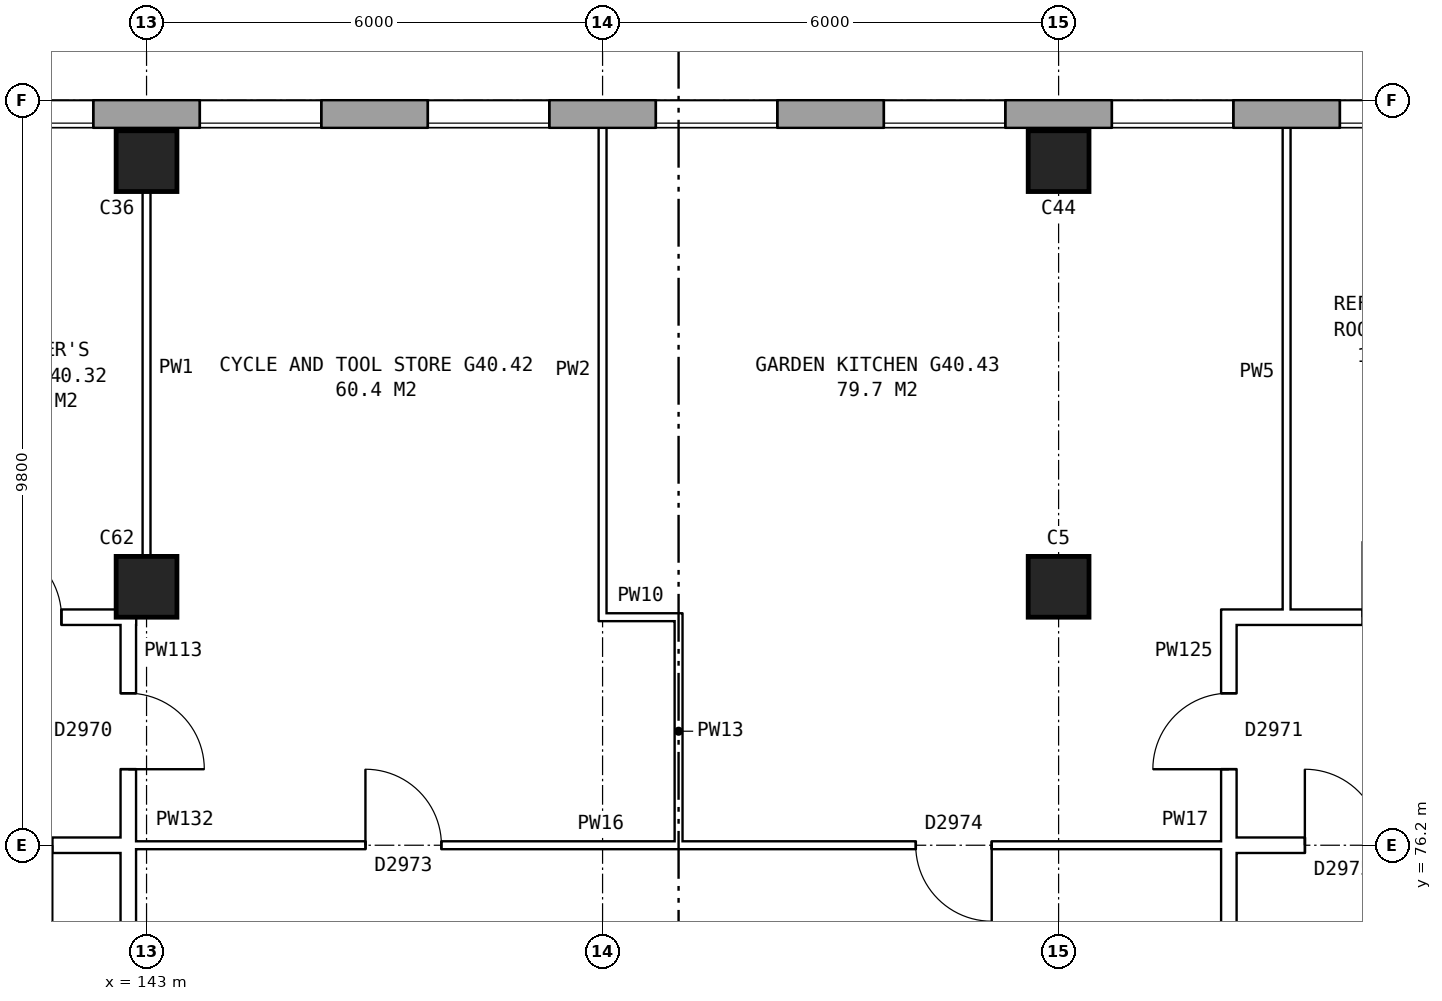
"""IFC4 building model, lengths in metres.
Left out: names, types, materials, properties, quantities, classifications, styles, units other than length and angle.
Written with IfcOpenShell. Run it as: python <this file> out.ifc"""

import sys

from ifc_helpers import new_model, si_unit, direction, frame, frame_2d, origin, origin_2d, place, context, subcontext, project, spatial, rectangle, extrude, element, fill, save


model = new_model("IFC4")
c1 = context("Model", 3, precision=1e-05, world=origin(), true_north=direction((0.0, 1.0)))
c2 = subcontext(c1, "Body", "Model", "MODEL_VIEW")
j1 = project(units=[si_unit("LENGTHUNIT", "METRE"), si_unit("PLANEANGLEUNIT", "RADIAN")], contexts=[c1])
p1 = place(None, origin())
s1 = spatial("IfcSite", under=j1, at=p1, CompositionType="ELEMENT")
p2 = place(p1, origin())
s2 = spatial("IfcBuilding", under=s1, at=p2, CompositionType="ELEMENT")
p3 = place(p2, frame((0.0, 0.0, 142.3)))
s3 = spatial("IfcBuildingStorey", under=s2, at=p3, CompositionType="ELEMENT", Elevation=142.3)
for number, where, z_axis, x_axis in (
    (1, (143.0, 79.6, 0.0), (0.0, 0.0, 1.0), (1.0, 0.0, 0.0)),
    (2, (143.0, 85.2, 0.0), (0.0, 0.0, 1.0), (1.0, 0.0, 0.0)),
    (3, (155.0, 79.6, 0.0), (0.0, 0.0, 1.0), (1.0, 0.0, 0.0)),
    (4, (155.0, 85.2, 0.0), (0.0, 0.0, 1.0), (1.0, 0.0, 0.0)),
):
    element("IfcColumn", number, at=place(p3, frame(where, z_axis=z_axis, x_axis=x_axis)), inside=s3, PredefinedType="COLUMN", context=c2, shape_type="SweptSolid", body=[
        extrude(rectangle(XDim=0.8, YDim=0.8, at=origin_2d()), origin(), (0.0, 0.0, 1.0), 5.6),
    ])
p4 = place(p3, frame((168.425, 85.82, 0.0), z_axis=(0.0, 0.0, 1.0), x_axis=(-1.0, 0.0, 0.0)))
e5 = element("IfcWall", 5, at=p4, inside=s3, PredefinedType="STANDARD", context=c2, shape_type="SweptSolid", body=[
    extrude(rectangle(XDim=34.351, YDim=0.36, at=frame_2d((17.175, 0.0))), origin(), (0.0, 0.0, 1.0), 5.6),
])
p5 = place(p4, frame((2.125, 0.0, 0.15)))
e6 = element("IfcOpeningElement", 6, at=p5, cuts=e5, PredefinedType="OPENING", context=c2, shape_type="SweptSolid", body=[
    extrude(rectangle(XDim=1.6, YDim=2.4, at=frame_2d((0.8, 1.2))), frame((0.0, 0.19, 0.0), z_axis=(0.0, -1.0, 0.0), x_axis=(1.0, 0.0, 0.0)), (0.0, 0.0, 1.0), 0.38),
])
p6 = place(p4, frame((5.125, 0.0, 0.15)))
e7 = element("IfcOpeningElement", 7, at=p6, cuts=e5, PredefinedType="OPENING", context=c2, shape_type="SweptSolid", body=[
    extrude(rectangle(XDim=1.6, YDim=2.4, at=frame_2d((0.8, 1.2))), frame((0.0, 0.19, 0.0), z_axis=(0.0, -1.0, 0.0), x_axis=(1.0, 0.0, 0.0)), (0.0, 0.0, 1.0), 0.38),
])
p7 = place(p4, frame((8.125, 0.0, 0.15)))
e8 = element("IfcOpeningElement", 8, at=p7, cuts=e5, PredefinedType="OPENING", context=c2, shape_type="SweptSolid", body=[
    extrude(rectangle(XDim=1.6, YDim=2.4, at=frame_2d((0.8, 1.2))), frame((0.0, 0.19, 0.0), z_axis=(0.0, -1.0, 0.0), x_axis=(1.0, 0.0, 0.0)), (0.0, 0.0, 1.0), 0.38),
])
p8 = place(p4, frame((11.125, 0.0, 0.15)))
e9 = element("IfcOpeningElement", 9, at=p8, cuts=e5, PredefinedType="OPENING", context=c2, shape_type="SweptSolid", body=[
    extrude(rectangle(XDim=1.6, YDim=2.4, at=frame_2d((0.8, 1.2))), frame((0.0, 0.19, 0.0), z_axis=(0.0, -1.0, 0.0), x_axis=(1.0, 0.0, 0.0)), (0.0, 0.0, 1.0), 0.38),
])
p9 = place(p4, frame((14.125, 0.0, 0.15)))
e10 = element("IfcOpeningElement", 10, at=p9, cuts=e5, PredefinedType="OPENING", context=c2, shape_type="SweptSolid", body=[
    extrude(rectangle(XDim=1.6, YDim=2.4, at=frame_2d((0.8, 1.2))), frame((0.0, 0.19, 0.0), z_axis=(0.0, -1.0, 0.0), x_axis=(1.0, 0.0, 0.0)), (0.0, 0.0, 1.0), 0.38),
])
p10 = place(p4, frame((17.125, 0.0, 0.15)))
e11 = element("IfcOpeningElement", 11, at=p10, cuts=e5, PredefinedType="OPENING", context=c2, shape_type="SweptSolid", body=[
    extrude(rectangle(XDim=1.6, YDim=2.4, at=frame_2d((0.8, 1.2))), frame((0.0, 0.19, 0.0), z_axis=(0.0, -1.0, 0.0), x_axis=(1.0, 0.0, 0.0)), (0.0, 0.0, 1.0), 0.38),
])
p11 = place(p4, frame((20.125, 0.0, 0.15)))
e12 = element("IfcOpeningElement", 12, at=p11, cuts=e5, PredefinedType="OPENING", context=c2, shape_type="SweptSolid", body=[
    extrude(rectangle(XDim=1.6, YDim=2.4, at=frame_2d((0.8, 1.2))), frame((0.0, 0.19, 0.0), z_axis=(0.0, -1.0, 0.0), x_axis=(1.0, 0.0, 0.0)), (0.0, 0.0, 1.0), 0.38),
])
p12 = place(p4, frame((23.125, 0.0, 0.15)))
e13 = element("IfcOpeningElement", 13, at=p12, cuts=e5, PredefinedType="OPENING", context=c2, shape_type="SweptSolid", body=[
    extrude(rectangle(XDim=1.6, YDim=2.4, at=frame_2d((0.8, 1.2))), frame((0.0, 0.19, 0.0), z_axis=(0.0, -1.0, 0.0), x_axis=(1.0, 0.0, 0.0)), (0.0, 0.0, 1.0), 0.38),
])
p13 = place(p4, frame((26.125, 0.0, 0.15)))
e14 = element("IfcOpeningElement", 14, at=p13, cuts=e5, PredefinedType="OPENING", context=c2, shape_type="SweptSolid", body=[
    extrude(rectangle(XDim=1.6, YDim=2.4, at=frame_2d((0.8, 1.2))), frame((0.0, 0.19, 0.0), z_axis=(0.0, -1.0, 0.0), x_axis=(1.0, 0.0, 0.0)), (0.0, 0.0, 1.0), 0.38),
])
p14 = place(p4, frame((29.125, 0.0, 0.15)))
e15 = element("IfcOpeningElement", 15, at=p14, cuts=e5, PredefinedType="OPENING", context=c2, shape_type="SweptSolid", body=[
    extrude(rectangle(XDim=1.6, YDim=2.4, at=frame_2d((0.8, 1.2))), frame((0.0, 0.19, 0.0), z_axis=(0.0, -1.0, 0.0), x_axis=(1.0, 0.0, 0.0)), (0.0, 0.0, 1.0), 0.38),
])
p15 = place(p4, frame((32.125, 0.0, 0.15)))
e16 = element("IfcOpeningElement", 16, at=p15, cuts=e5, PredefinedType="OPENING", context=c2, shape_type="SweptSolid", body=[
    extrude(rectangle(XDim=1.6, YDim=2.4, at=frame_2d((0.8, 1.2))), frame((0.0, 0.19, 0.0), z_axis=(0.0, -1.0, 0.0), x_axis=(1.0, 0.0, 0.0)), (0.0, 0.0, 1.0), 0.38),
])
p16 = place(p3, frame((142.76, 63.9, 0.0), z_axis=(0.0, 0.0, 1.0), x_axis=(0.0, 1.0, 0.0)))
e17 = element("IfcWall", 17, at=p16, inside=s3, PredefinedType="PARTITIONING", context=c2, shape_type="SweptSolid", body=[
    extrude(rectangle(XDim=12.2, YDim=0.2, at=frame_2d((6.1, 0.0))), origin(), (0.0, 0.0, 1.0), 5.6),
])
p17 = place(p16, frame((5.1, 0.0, 0.0)))
e18 = element("IfcOpeningElement", 18, at=p17, cuts=e17, PredefinedType="OPENING", context=c2, shape_type="SweptSolid", body=[
    extrude(rectangle(XDim=2.0, YDim=2.1, at=frame_2d((1.0, 1.05))), frame((0.0, 0.11, 0.0), z_axis=(0.0, -1.0, 0.0), x_axis=(1.0, 0.0, 0.0)), (0.0, 0.0, 1.0), 0.22),
])
p18 = place(p3, frame((157.24, 63.9, 0.0), z_axis=(0.0, 0.0, 1.0), x_axis=(0.0, 1.0, 0.0)))
e19 = element("IfcWall", 19, at=p18, inside=s3, PredefinedType="PARTITIONING", context=c2, shape_type="SweptSolid", body=[
    extrude(rectangle(XDim=12.2, YDim=0.2, at=frame_2d((6.1, 0.0))), origin(), (0.0, 0.0, 1.0), 5.6),
])
p19 = place(p18, frame((5.1, 0.0, 0.0)))
e20 = element("IfcOpeningElement", 20, at=p19, cuts=e19, PredefinedType="OPENING", context=c2, shape_type="SweptSolid", body=[
    extrude(rectangle(XDim=2.0, YDim=2.1, at=frame_2d((1.0, 1.05))), frame((0.0, 0.11, 0.0), z_axis=(0.0, -1.0, 0.0), x_axis=(1.0, 0.0, 0.0)), (0.0, 0.0, 1.0), 0.22),
])
p20 = place(p3, frame((139.76, 76.2, 0.0), z_axis=(0.0, 0.0, 1.0), x_axis=(1.0, 0.0, 0.0)))
e21 = element("IfcWall", 21, at=p20, inside=s3, PredefinedType="PARTITIONING", context=c2, shape_type="SweptSolid", body=[
    extrude(rectangle(XDim=3.1, YDim=0.2, at=frame_2d((1.55, 0.0))), origin(), (0.0, 0.0, 1.0), 5.6),
])
p21 = place(p20, frame((1.0, 0.0, 0.0)))
e22 = element("IfcOpeningElement", 22, at=p21, cuts=e21, PredefinedType="OPENING", context=c2, shape_type="SweptSolid", body=[
    extrude(rectangle(XDim=1.0, YDim=2.1, at=frame_2d((0.5, 1.05))), frame((0.0, 0.11, 0.0), z_axis=(0.0, -1.0, 0.0), x_axis=(1.0, 0.0, 0.0)), (0.0, 0.0, 1.0), 0.22),
])
p22 = place(p3, frame((157.14, 76.2, 0.0), z_axis=(0.0, 0.0, 1.0), x_axis=(1.0, 0.0, 0.0)))
e23 = element("IfcWall", 23, at=p22, inside=s3, PredefinedType="PARTITIONING", context=c2, shape_type="SweptSolid", body=[
    extrude(rectangle(XDim=3.1, YDim=0.2, at=frame_2d((1.55, 0.0))), origin(), (0.0, 0.0, 1.0), 5.6),
])
p23 = place(p22, frame((1.1, 0.0, 0.0)))
e24 = element("IfcOpeningElement", 24, at=p23, cuts=e23, PredefinedType="OPENING", context=c2, shape_type="SweptSolid", body=[
    extrude(rectangle(XDim=1.0, YDim=2.1, at=frame_2d((0.5, 1.05))), frame((0.0, 0.11, 0.0), z_axis=(0.0, -1.0, 0.0), x_axis=(1.0, 0.0, 0.0)), (0.0, 0.0, 1.0), 0.22),
])
p24 = place(p3, frame((142.66, 76.2, 0.0), z_axis=(0.0, 0.0, 1.0), x_axis=(1.0, 0.0, 0.0)))
e25 = element("IfcWall", 25, at=p24, inside=s3, PredefinedType="PARTITIONING", context=c2, shape_type="SweptSolid", body=[
    extrude(rectangle(XDim=14.68, YDim=0.1, at=frame_2d((7.34, 0.0))), origin(), (0.0, 0.0, 1.0), 5.6),
])
p25 = place(p24, frame((3.22, 0.0, 0.0)))
e26 = element("IfcOpeningElement", 26, at=p25, cuts=e25, PredefinedType="OPENING", context=c2, shape_type="SweptSolid", body=[
    extrude(rectangle(XDim=1.0, YDim=2.1, at=frame_2d((0.5, 1.05))), frame((0.0, 0.06, 0.0), z_axis=(0.0, -1.0, 0.0), x_axis=(1.0, 0.0, 0.0)), (0.0, 0.0, 1.0), 0.12),
])
p26 = place(p24, frame((10.46, 0.0, 0.0)))
e27 = element("IfcOpeningElement", 27, at=p26, cuts=e25, PredefinedType="OPENING", context=c2, shape_type="SweptSolid", body=[
    extrude(rectangle(XDim=1.0, YDim=2.1, at=frame_2d((0.5, 1.05))), frame((0.0, 0.06, 0.0), z_axis=(0.0, -1.0, 0.0), x_axis=(1.0, 0.0, 0.0)), (0.0, 0.0, 1.0), 0.12),
])
p27 = place(p3, frame((131.24, 79.2, 0.0), z_axis=(0.0, 0.0, 1.0), x_axis=(1.0, 0.0, 0.0)))
e28 = element("IfcWall", 28, at=p27, inside=s3, PredefinedType="PARTITIONING", context=c2, shape_type="SweptSolid", body=[
    extrude(rectangle(XDim=11.622, YDim=0.2, at=frame_2d((5.811, 0.0))), origin(), (0.0, 0.0, 1.0), 5.6),
])
p28 = place(p27, frame((2.44, 0.0, 0.0)))
e29 = element("IfcOpeningElement", 29, at=p28, cuts=e28, PredefinedType="OPENING", context=c2, shape_type="SweptSolid", body=[
    extrude(rectangle(XDim=1.0, YDim=2.1, at=frame_2d((0.5, 1.05))), frame((0.0, 0.11, 0.0), z_axis=(0.0, -1.0, 0.0), x_axis=(1.0, 0.0, 0.0)), (0.0, 0.0, 1.0), 0.22),
])
p29 = place(p27, frame((6.81, 0.0, 0.0)))
e30 = element("IfcOpeningElement", 30, at=p29, cuts=e28, PredefinedType="OPENING", context=c2, shape_type="SweptSolid", body=[
    extrude(rectangle(XDim=0.9, YDim=2.1, at=frame_2d((0.45, 1.05))), frame((0.0, 0.11, 0.0), z_axis=(0.0, -1.0, 0.0), x_axis=(1.0, 0.0, 0.0)), (0.0, 0.0, 1.0), 0.22),
])
p30 = place(p27, frame((9.641, 0.0, 0.0)))
e31 = element("IfcOpeningElement", 31, at=p30, cuts=e28, PredefinedType="OPENING", context=c2, shape_type="SweptSolid", body=[
    extrude(rectangle(XDim=1.0, YDim=2.1, at=frame_2d((0.5, 1.05))), frame((0.0, 0.11, 0.0), z_axis=(0.0, -1.0, 0.0), x_axis=(1.0, 0.0, 0.0)), (0.0, 0.0, 1.0), 0.22),
])
p31 = place(p3, frame((157.14, 79.2, 0.0), z_axis=(0.0, 0.0, 1.0), x_axis=(1.0, 0.0, 0.0)))
e32 = element("IfcWall", 32, at=p31, inside=s3, PredefinedType="PARTITIONING", context=c2, shape_type="SweptSolid", body=[
    extrude(rectangle(XDim=14.12, YDim=0.2, at=frame_2d((7.06, 0.0))), origin(), (0.0, 0.0, 1.0), 5.6),
])
p32 = place(p31, frame((1.86, 0.0, 0.0)))
e33 = element("IfcOpeningElement", 33, at=p32, cuts=e32, PredefinedType="OPENING", context=c2, shape_type="SweptSolid", body=[
    extrude(rectangle(XDim=1.0, YDim=2.1, at=frame_2d((0.5, 1.05))), frame((0.0, 0.11, 0.0), z_axis=(0.0, -1.0, 0.0), x_axis=(1.0, 0.0, 0.0)), (0.0, 0.0, 1.0), 0.22),
])
p33 = place(p31, frame((4.91, 0.0, 0.0)))
e34 = element("IfcOpeningElement", 34, at=p33, cuts=e32, PredefinedType="OPENING", context=c2, shape_type="SweptSolid", body=[
    extrude(rectangle(XDim=0.9, YDim=2.1, at=frame_2d((0.45, 1.05))), frame((0.0, 0.11, 0.0), z_axis=(0.0, -1.0, 0.0), x_axis=(1.0, 0.0, 0.0)), (0.0, 0.0, 1.0), 0.22),
])
p34 = place(p31, frame((7.91, 0.0, 0.0)))
e35 = element("IfcOpeningElement", 35, at=p34, cuts=e32, PredefinedType="OPENING", context=c2, shape_type="SweptSolid", body=[
    extrude(rectangle(XDim=0.9, YDim=2.1, at=frame_2d((0.45, 1.05))), frame((0.0, 0.11, 0.0), z_axis=(0.0, -1.0, 0.0), x_axis=(1.0, 0.0, 0.0)), (0.0, 0.0, 1.0), 0.22),
])
p35 = place(p31, frame((11.43, 0.0, 0.0)))
e36 = element("IfcOpeningElement", 36, at=p35, cuts=e32, PredefinedType="OPENING", context=c2, shape_type="SweptSolid", body=[
    extrude(rectangle(XDim=1.0, YDim=2.1, at=frame_2d((0.5, 1.05))), frame((0.0, 0.11, 0.0), z_axis=(0.0, -1.0, 0.0), x_axis=(1.0, 0.0, 0.0)), (0.0, 0.0, 1.0), 0.22),
])
p36 = place(p3, frame((148.95, 79.2, 0.0), z_axis=(0.0, 0.0, 1.0), x_axis=(1.0, 0.0, 0.0)))
e37 = element("IfcWall", 37, at=p36, inside=s3, PredefinedType="PARTITIONING", context=c2, shape_type="SweptSolid", body=[
    extrude(rectangle(XDim=1.1, YDim=0.1, at=frame_2d((0.55, 0.0))), origin(), (0.0, 0.0, 1.0), 5.6),
])
p37 = place(p3, frame((142.76, 76.1, 0.0), z_axis=(0.0, 0.0, 1.0), x_axis=(0.0, 1.0, 0.0)))
e38 = element("IfcWall", 38, at=p37, inside=s3, PredefinedType="PARTITIONING", context=c2, shape_type="SweptSolid", body=[
    extrude(rectangle(XDim=3.2, YDim=0.2, at=frame_2d((1.6, 0.0))), origin(), (0.0, 0.0, 1.0), 5.6),
])
p38 = place(p37, frame((1.1, 0.0, 0.0)))
e39 = element("IfcOpeningElement", 39, at=p38, cuts=e38, PredefinedType="OPENING", context=c2, shape_type="SweptSolid", body=[
    extrude(rectangle(XDim=1.0, YDim=2.1, at=frame_2d((0.5, 1.05))), frame((0.0, 0.11, 0.0), z_axis=(0.0, -1.0, 0.0), x_axis=(1.0, 0.0, 0.0)), (0.0, 0.0, 1.0), 0.22),
])
p39 = place(p3, frame((143.0, 79.2, 0.0), z_axis=(0.0, 0.0, 1.0), x_axis=(0.0, 1.0, 0.0)))
e40 = element("IfcWall", 40, at=p39, inside=s3, PredefinedType="PARTITIONING", context=c2, shape_type="SweptSolid", body=[
    extrude(rectangle(XDim=6.56, YDim=0.1, at=frame_2d((3.28, 0.0))), origin(), (0.0, 0.0, 1.0), 5.6),
])
p40 = place(p3, frame((149.0, 79.15, 0.0), z_axis=(0.0, 0.0, 1.0), x_axis=(0.0, 1.0, 0.0)))
e41 = element("IfcWall", 41, at=p40, inside=s3, PredefinedType="PARTITIONING", context=c2, shape_type="SweptSolid", body=[
    extrude(rectangle(XDim=6.61, YDim=0.1, at=frame_2d((3.305, 0.0))), origin(), (0.0, 0.0, 1.0), 5.6),
])
p41 = place(p3, frame((150.0, 76.15, 0.0), z_axis=(0.0, 0.0, 1.0), x_axis=(0.0, 1.0, 0.0)))
e42 = element("IfcWall", 42, at=p41, inside=s3, PredefinedType="PARTITIONING", context=c2, shape_type="SweptSolid", body=[
    extrude(rectangle(XDim=3.1, YDim=0.1, at=frame_2d((1.55, 0.0))), origin(), (0.0, 0.0, 1.0), 5.6),
])
p42 = place(p3, frame((157.24, 76.1, 0.0), z_axis=(0.0, 0.0, 1.0), x_axis=(0.0, 1.0, 0.0)))
e43 = element("IfcWall", 43, at=p42, inside=s3, PredefinedType="PARTITIONING", context=c2, shape_type="SweptSolid", body=[
    extrude(rectangle(XDim=3.2, YDim=0.2, at=frame_2d((1.6, 0.0))), origin(), (0.0, 0.0, 1.0), 5.6),
])
p43 = place(p42, frame((1.1, 0.0, 0.0)))
e44 = element("IfcOpeningElement", 44, at=p43, cuts=e43, PredefinedType="OPENING", context=c2, shape_type="SweptSolid", body=[
    extrude(rectangle(XDim=1.0, YDim=2.1, at=frame_2d((0.5, 1.05))), frame((0.0, 0.11, 0.0), z_axis=(0.0, -1.0, 0.0), x_axis=(1.0, 0.0, 0.0)), (0.0, 0.0, 1.0), 0.22),
])
p44 = place(p3, frame((158.0, 79.1, 0.0), z_axis=(0.0, 0.0, 1.0), x_axis=(0.0, 1.0, 0.0)))
e45 = element("IfcWall", 45, at=p44, inside=s3, PredefinedType="PARTITIONING", context=c2, shape_type="SweptSolid", body=[
    extrude(rectangle(XDim=6.66, YDim=0.1, at=frame_2d((3.33, 0.0))), origin(), (0.0, 0.0, 1.0), 5.6),
])
p45 = place(p7, origin())
e46 = element("IfcWindow", 46, at=p45, inside=s3, PartitioningType="SINGLE_PANEL", PredefinedType="WINDOW", context=c2, shape_type="SweptSolid", body=[
    extrude(rectangle(XDim=1.6, YDim=2.4, at=frame_2d((0.8, 1.2))), frame((0.0, 0.15, 0.0), z_axis=(0.0, -1.0, 0.0), x_axis=(1.0, 0.0, 0.0)), (0.0, 0.0, 1.0), 0.06),
])
fill(e8, e46)
p46 = place(p8, origin())
e47 = element("IfcWindow", 47, at=p46, inside=s3, PartitioningType="SINGLE_PANEL", PredefinedType="WINDOW", context=c2, shape_type="SweptSolid", body=[
    extrude(rectangle(XDim=1.6, YDim=2.4, at=frame_2d((0.8, 1.2))), frame((0.0, 0.15, 0.0), z_axis=(0.0, -1.0, 0.0), x_axis=(1.0, 0.0, 0.0)), (0.0, 0.0, 1.0), 0.06),
])
fill(e9, e47)
p47 = place(p9, origin())
e48 = element("IfcWindow", 48, at=p47, inside=s3, PartitioningType="SINGLE_PANEL", PredefinedType="WINDOW", context=c2, shape_type="SweptSolid", body=[
    extrude(rectangle(XDim=1.6, YDim=2.4, at=frame_2d((0.8, 1.2))), frame((0.0, 0.15, 0.0), z_axis=(0.0, -1.0, 0.0), x_axis=(1.0, 0.0, 0.0)), (0.0, 0.0, 1.0), 0.06),
])
fill(e10, e48)
p48 = place(p10, origin())
e49 = element("IfcWindow", 49, at=p48, inside=s3, PartitioningType="SINGLE_PANEL", PredefinedType="WINDOW", context=c2, shape_type="SweptSolid", body=[
    extrude(rectangle(XDim=1.6, YDim=2.4, at=frame_2d((0.8, 1.2))), frame((0.0, 0.15, 0.0), z_axis=(0.0, -1.0, 0.0), x_axis=(1.0, 0.0, 0.0)), (0.0, 0.0, 1.0), 0.06),
])
fill(e11, e49)
p49 = place(p11, origin())
e50 = element("IfcWindow", 50, at=p49, inside=s3, PartitioningType="SINGLE_PANEL", PredefinedType="WINDOW", context=c2, shape_type="SweptSolid", body=[
    extrude(rectangle(XDim=1.6, YDim=2.4, at=frame_2d((0.8, 1.2))), frame((0.0, 0.15, 0.0), z_axis=(0.0, -1.0, 0.0), x_axis=(1.0, 0.0, 0.0)), (0.0, 0.0, 1.0), 0.06),
])
fill(e12, e50)
p50 = place(p12, origin())
e51 = element("IfcWindow", 51, at=p50, inside=s3, PartitioningType="SINGLE_PANEL", PredefinedType="WINDOW", context=c2, shape_type="SweptSolid", body=[
    extrude(rectangle(XDim=1.6, YDim=2.4, at=frame_2d((0.8, 1.2))), frame((0.0, 0.15, 0.0), z_axis=(0.0, -1.0, 0.0), x_axis=(1.0, 0.0, 0.0)), (0.0, 0.0, 1.0), 0.06),
])
fill(e13, e51)
p51 = place(p13, origin())
e52 = element("IfcWindow", 52, at=p51, inside=s3, PartitioningType="SINGLE_PANEL", PredefinedType="WINDOW", context=c2, shape_type="SweptSolid", body=[
    extrude(rectangle(XDim=1.6, YDim=2.4, at=frame_2d((0.8, 1.2))), frame((0.0, 0.15, 0.0), z_axis=(0.0, -1.0, 0.0), x_axis=(1.0, 0.0, 0.0)), (0.0, 0.0, 1.0), 0.06),
])
fill(e14, e52)
p52 = place(p23, origin())
e53 = element("IfcDoor", 53, at=p52, inside=s3, OperationType="SINGLE_SWING_LEFT", PredefinedType="DOOR", context=c2, shape_type="SweptSolid", body=[
    extrude(rectangle(XDim=1.0, YDim=2.1, at=frame_2d((0.5, 1.05))), frame((0.0, 0.025, 0.0), z_axis=(0.0, -1.0, 0.0), x_axis=(1.0, 0.0, 0.0)), (0.0, 0.0, 1.0), 0.05),
])
fill(e24, e53)
p53 = place(p25, origin())
e54 = element("IfcDoor", 54, at=p53, inside=s3, OperationType="SINGLE_SWING_LEFT", PredefinedType="DOOR", context=c2, shape_type="SweptSolid", body=[
    extrude(rectangle(XDim=1.0, YDim=2.1, at=frame_2d((0.5, 1.05))), frame((0.0, 0.025, 0.0), z_axis=(0.0, -1.0, 0.0), x_axis=(1.0, 0.0, 0.0)), (0.0, 0.0, 1.0), 0.05),
])
fill(e26, e54)
p54 = place(p26, frame((1.0, 0.0, 0.0), z_axis=(0.0, 0.0, 1.0), x_axis=(-1.0, 0.0, 0.0)))
e55 = element("IfcDoor", 55, at=p54, inside=s3, OperationType="SINGLE_SWING_LEFT", PredefinedType="DOOR", context=c2, shape_type="SweptSolid", body=[
    extrude(rectangle(XDim=1.0, YDim=2.1, at=frame_2d((0.5, 1.05))), frame((0.0, 0.025, 0.0), z_axis=(0.0, -1.0, 0.0), x_axis=(1.0, 0.0, 0.0)), (0.0, 0.0, 1.0), 0.05),
])
fill(e27, e55)
p55 = place(p30, origin())
e56 = element("IfcDoor", 56, at=p55, inside=s3, OperationType="SINGLE_SWING_LEFT", PredefinedType="DOOR", context=c2, shape_type="SweptSolid", body=[
    extrude(rectangle(XDim=1.0, YDim=2.1, at=frame_2d((0.5, 1.05))), frame((0.0, 0.025, 0.0), z_axis=(0.0, -1.0, 0.0), x_axis=(1.0, 0.0, 0.0)), (0.0, 0.0, 1.0), 0.05),
])
fill(e31, e56)
p56 = place(p38, frame((1.0, 0.0, 0.0), z_axis=(0.0, 0.0, 1.0), x_axis=(-1.0, 0.0, 0.0)))
e57 = element("IfcDoor", 57, at=p56, inside=s3, OperationType="SINGLE_SWING_RIGHT", PredefinedType="DOOR", context=c2, shape_type="SweptSolid", body=[
    extrude(rectangle(XDim=1.0, YDim=2.1, at=frame_2d((0.5, 1.05))), frame((0.0, 0.025, 0.0), z_axis=(0.0, -1.0, 0.0), x_axis=(1.0, 0.0, 0.0)), (0.0, 0.0, 1.0), 0.05),
])
fill(e39, e57)
p57 = place(p43, origin())
e58 = element("IfcDoor", 58, at=p57, inside=s3, OperationType="SINGLE_SWING_LEFT", PredefinedType="DOOR", context=c2, shape_type="SweptSolid", body=[
    extrude(rectangle(XDim=1.0, YDim=2.1, at=frame_2d((0.5, 1.05))), frame((0.0, 0.025, 0.0), z_axis=(0.0, -1.0, 0.0), x_axis=(1.0, 0.0, 0.0)), (0.0, 0.0, 1.0), 0.05),
])
fill(e44, e58)
save(model, sys.argv[1])
